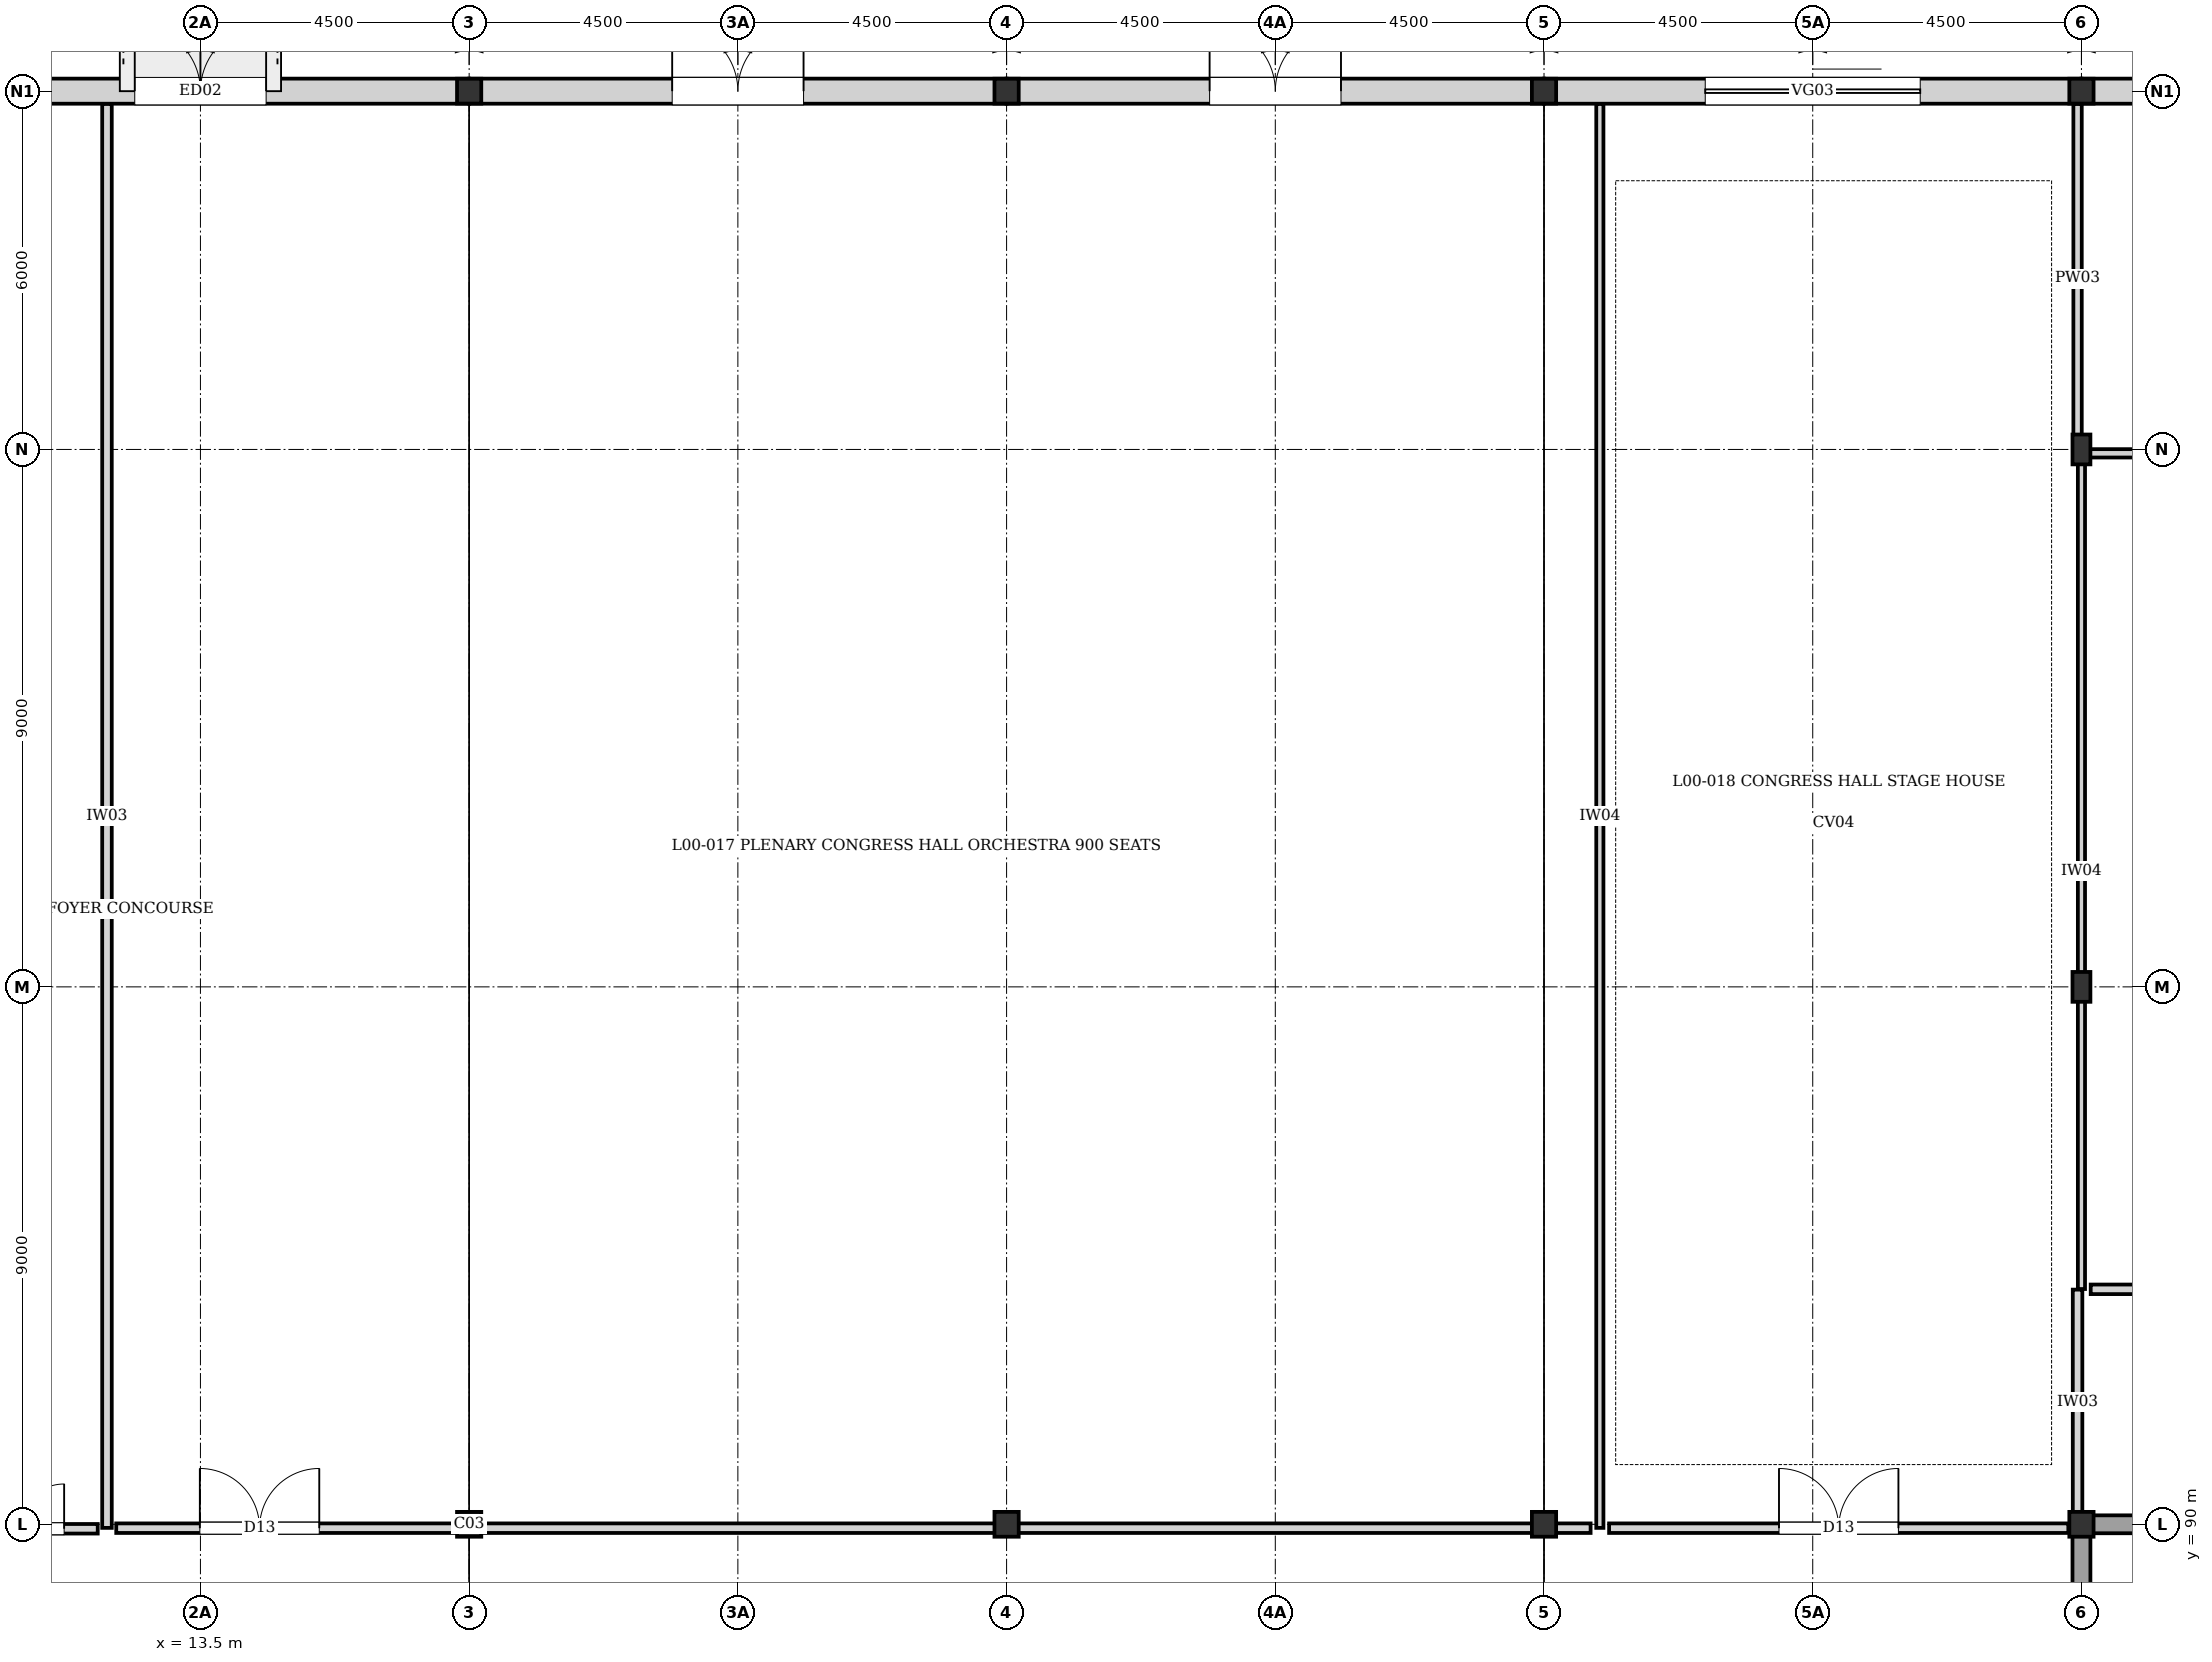
"""IFC4 building model, lengths in metres.
Left out: names, types, materials, properties, quantities, classifications, styles, units other than length and angle.
Written with IfcOpenShell. Run it as: python <this file> out.ifc"""

import sys

from ifc_helpers import new_model, si_unit, direction, frame, frame_2d, origin, origin_2d, place, context, subcontext, project, spatial, rectangle, i_section, extrude, element, fill, save


model = new_model("IFC4")
c1 = context("Model", 3, precision=1e-05, world=origin(), true_north=direction((0.0, 1.0)))
c2 = subcontext(c1, "Body", "Model", "MODEL_VIEW")
j1 = project(units=[si_unit("LENGTHUNIT", "METRE"), si_unit("PLANEANGLEUNIT", "RADIAN")], contexts=[c1])
p1 = place(None, origin())
s1 = spatial("IfcSite", under=j1, at=p1, CompositionType="ELEMENT")
p2 = place(p1, origin())
s2 = spatial("IfcBuilding", under=s1, at=p2, CompositionType="ELEMENT")
p3 = place(p2, origin())
s3 = spatial("IfcBuildingStorey", under=s2, at=p3, CompositionType="ELEMENT", Elevation=0.0)
for number, where, z_axis, x_axis in (
    (1, (18.0, 90.0, 0.0), (0.0, 0.0, 1.0), (1.0, 0.0, 0.0)),
    (2, (18.0, 114.0, 0.0), (0.0, 0.0, 1.0), (1.0, 0.0, 0.0)),
    (3, (27.0, 90.0, 0.0), (0.0, 0.0, 1.0), (1.0, 0.0, 0.0)),
    (4, (27.0, 114.0, 0.0), (0.0, 0.0, 1.0), (1.0, 0.0, 0.0)),
    (5, (36.0, 90.0, 0.0), (0.0, 0.0, 1.0), (1.0, 0.0, 0.0)),
    (6, (36.0, 114.0, 0.0), (0.0, 0.0, 1.0), (1.0, 0.0, 0.0)),
    (7, (45.0, 90.0, 0.0), (0.0, 0.0, 1.0), (1.0, 0.0, 0.0)),
):
    element("IfcColumn", number, at=place(p3, frame(where, z_axis=z_axis, x_axis=x_axis)), inside=s3, PredefinedType="COLUMN", context=c2, shape_type="SweptSolid", body=[
        extrude(i_section(OverallWidth=0.406, OverallDepth=0.416, WebThickness=0.022, FlangeThickness=0.038, at=origin_2d()), origin(), (0.0, 0.0, 1.0), 4.32),
    ])
for number, where, z_axis, x_axis in (
    (8, (45.0, 99.0, 0.0), (0.0, 0.0, 1.0), (1.0, 0.0, 0.0)),
    (9, (45.0, 108.0, 0.0), (0.0, 0.0, 1.0), (1.0, 0.0, 0.0)),
):
    element("IfcColumn", number, at=place(p3, frame(where, z_axis=z_axis, x_axis=x_axis)), inside=s3, PredefinedType="COLUMN", context=c2, shape_type="SweptSolid", body=[
        extrude(i_section(OverallWidth=0.3, OverallDepth=0.5, WebThickness=0.014, FlangeThickness=0.028, at=origin_2d()), origin(), (0.0, 0.0, 1.0), 4.32),
    ])
p4 = place(p3, frame((45.0, 114.0, 0.0), z_axis=(0.0, 0.0, 1.0), x_axis=(1.0, 0.0, 0.0)))
e10 = element("IfcColumn", 10, at=p4, inside=s3, PredefinedType="COLUMN", context=c2, shape_type="SweptSolid", body=[
    extrude(i_section(OverallWidth=0.406, OverallDepth=0.416, WebThickness=0.022, FlangeThickness=0.038, at=origin_2d()), origin(), (0.0, 0.0, 1.0), 4.32),
])
p5 = place(p3, frame((9.0, 114.0, 0.0), z_axis=(0.0, 0.0, 1.0), x_axis=(1.0, 0.0, 0.0)))
e11 = element("IfcWall", 11, at=p5, inside=s3, PredefinedType="SOLIDWALL", context=c2, shape_type="SweptSolid", body=[
    extrude(rectangle(XDim=9.0, YDim=0.42, at=frame_2d((4.5, 0.0))), origin(), (0.0, 0.0, 1.0), 3.655),
])
p6 = place(p5, frame((3.4, 0.0, 0.0)))
e12 = element("IfcOpeningElement", 12, at=p6, cuts=e11, PredefinedType="OPENING", context=c2, shape_type="SweptSolid", body=[
    extrude(rectangle(XDim=2.2, YDim=2.5, at=frame_2d((1.1, 1.25))), frame((0.0, 0.22, 0.0), z_axis=(0.0, -1.0, 0.0), x_axis=(1.0, 0.0, 0.0)), (0.0, 0.0, 1.0), 0.44),
])
p7 = place(p3, frame((18.0, 114.0, 0.0), z_axis=(0.0, 0.0, 1.0), x_axis=(1.0, 0.0, 0.0)))
e13 = element("IfcWall", 13, at=p7, inside=s3, PredefinedType="SOLIDWALL", context=c2, shape_type="SweptSolid", body=[
    extrude(rectangle(XDim=9.0, YDim=0.42, at=frame_2d((4.5, 0.0))), origin(), (0.0, 0.0, 1.0), 3.825),
])
p8 = place(p7, frame((3.4, 0.0, 0.0)))
e14 = element("IfcOpeningElement", 14, at=p8, cuts=e13, PredefinedType="OPENING", context=c2, shape_type="SweptSolid", body=[
    extrude(rectangle(XDim=2.2, YDim=2.5, at=frame_2d((1.1, 1.25))), frame((0.0, 0.22, 0.0), z_axis=(0.0, -1.0, 0.0), x_axis=(1.0, 0.0, 0.0)), (0.0, 0.0, 1.0), 0.44),
])
p9 = place(p3, frame((27.0, 114.0, 0.0), z_axis=(0.0, 0.0, 1.0), x_axis=(1.0, 0.0, 0.0)))
e15 = element("IfcWall", 15, at=p9, inside=s3, PredefinedType="SOLIDWALL", context=c2, shape_type="SweptSolid", body=[
    extrude(rectangle(XDim=9.0, YDim=0.42, at=frame_2d((4.5, 0.0))), origin(), (0.0, 0.0, 1.0), 3.755),
])
p10 = place(p9, frame((3.4, 0.0, 0.0)))
e16 = element("IfcOpeningElement", 16, at=p10, cuts=e15, PredefinedType="OPENING", context=c2, shape_type="SweptSolid", body=[
    extrude(rectangle(XDim=2.2, YDim=2.5, at=frame_2d((1.1, 1.25))), frame((0.0, 0.22, 0.0), z_axis=(0.0, -1.0, 0.0), x_axis=(1.0, 0.0, 0.0)), (0.0, 0.0, 1.0), 0.44),
])
p11 = place(p3, frame((36.0, 114.0, 0.0), z_axis=(0.0, 0.0, 1.0), x_axis=(1.0, 0.0, 0.0)))
e17 = element("IfcWall", 17, at=p11, inside=s3, PredefinedType="SOLIDWALL", context=c2, shape_type="SweptSolid", body=[
    extrude(rectangle(XDim=9.0, YDim=0.42, at=frame_2d((4.5, 0.0))), origin(), (0.0, 0.0, 1.0), 3.695),
])
p12 = place(p11, frame((2.7, 0.0, 0.0)))
e18 = element("IfcOpeningElement", 18, at=p12, cuts=e17, PredefinedType="OPENING", context=c2, shape_type="SweptSolid", body=[
    extrude(rectangle(XDim=3.6, YDim=3.1, at=frame_2d((1.8, 1.55))), frame((0.0, 0.22, 0.0), z_axis=(0.0, -1.0, 0.0), x_axis=(1.0, 0.0, 0.0)), (0.0, 0.0, 1.0), 0.44),
])
p13 = place(p3, frame((45.0, 114.0, 0.0), z_axis=(0.0, 0.0, 1.0), x_axis=(1.0, 0.0, 0.0)))
e19 = element("IfcWall", 19, at=p13, inside=s3, PredefinedType="SOLIDWALL", context=c2, shape_type="SweptSolid", body=[
    extrude(rectangle(XDim=9.0, YDim=0.42, at=frame_2d((4.5, 0.0))), origin(), (0.0, 0.0, 1.0), 3.655),
])
p14 = place(p3, frame((45.0, 90.0, 0.0), z_axis=(0.0, 0.0, 1.0), x_axis=(1.0, 0.0, 0.0)))
e20 = element("IfcWall", 20, at=p14, inside=s3, PredefinedType="SHEAR", context=c2, shape_type="SweptSolid", body=[
    extrude(rectangle(XDim=9.0, YDim=0.3, at=frame_2d((4.5, 0.0))), origin(), (0.0, 0.0, 1.0), 4.055),
])
p15 = place(p14, frame((6.05, 0.0, 0.0)))
e21 = element("IfcOpeningElement", 21, at=p15, cuts=e20, PredefinedType="OPENING", context=c2, shape_type="SweptSolid", body=[
    extrude(rectangle(XDim=1.4, YDim=2.02, at=frame_2d((0.7, 1.01))), frame((0.0, 0.16, 0.0), z_axis=(0.0, -1.0, 0.0), x_axis=(1.0, 0.0, 0.0)), (0.0, 0.0, 1.0), 0.32),
])
p16 = place(p3, frame((45.0, 81.0, 0.0), z_axis=(0.0, 0.0, 1.0), x_axis=(0.0, 1.0, 0.0)))
e22 = element("IfcWall", 22, at=p16, inside=s3, PredefinedType="SHEAR", context=c2, shape_type="SweptSolid", body=[
    extrude(rectangle(XDim=9.0, YDim=0.3, at=frame_2d((4.5, 0.0))), origin(), (0.0, 0.0, 1.0), 4.055),
])
p17 = place(p3, frame((11.935, 89.94, 0.0), z_axis=(0.0, 0.0, 1.0), x_axis=(0.0, 1.0, 0.0)))
e23 = element("IfcWall", 23, at=p17, inside=s3, PredefinedType="PARTITIONING", context=c2, shape_type="SweptSolid", body=[
    extrude(rectangle(XDim=23.845, YDim=0.16, at=frame_2d((11.922, 0.0))), origin(), (0.0, 0.0, 1.0), 4.055),
])
p18 = place(p3, frame((36.935, 89.94, 0.0), z_axis=(0.0, 0.0, 1.0), x_axis=(0.0, 1.0, 0.0)))
e24 = element("IfcWall", 24, at=p18, inside=s3, PredefinedType="PARTITIONING", context=c2, shape_type="SweptSolid", body=[
    extrude(rectangle(XDim=23.845, YDim=0.12, at=frame_2d((11.922, 0.0))), origin(), (0.0, 0.0, 1.0), 4.055),
])
p19 = place(p3, frame((44.935, 90.155, 0.0), z_axis=(0.0, 0.0, 1.0), x_axis=(0.0, 1.0, 0.0)))
e25 = element("IfcWall", 25, at=p19, inside=s3, PredefinedType="PARTITIONING", context=c2, shape_type="SweptSolid", body=[
    extrude(rectangle(XDim=3.775, YDim=0.16, at=frame_2d((1.887, 0.0))), origin(), (0.0, 0.0, 1.0), 4.055),
])
p20 = place(p3, frame((45.0, 93.94, 0.0), z_axis=(0.0, 0.0, 1.0), x_axis=(0.0, 1.0, 0.0)))
e26 = element("IfcWall", 26, at=p20, inside=s3, PredefinedType="PARTITIONING", context=c2, shape_type="SweptSolid", body=[
    extrude(rectangle(XDim=13.99, YDim=0.12, at=frame_2d((6.995, 0.0))), origin(), (0.0, 0.0, 1.0), 4.055),
])
p21 = place(p3, frame((44.935, 107.94, 0.0), z_axis=(0.0, 0.0, 1.0), x_axis=(0.0, 1.0, 0.0)))
e27 = element("IfcWall", 27, at=p21, inside=s3, PredefinedType="PLUMBINGWALL", context=c2, shape_type="SweptSolid", body=[
    extrude(rectangle(XDim=5.845, YDim=0.14, at=frame_2d((2.922, 0.0))), origin(), (0.0, 0.0, 1.0), 4.055),
])
p22 = place(p3, frame((9.155, 89.925, 0.0), z_axis=(0.0, 0.0, 1.0), x_axis=(1.0, 0.0, 0.0)))
e28 = element("IfcWall", 28, at=p22, inside=s3, PredefinedType="PARTITIONING", context=c2, shape_type="SweptSolid", body=[
    extrude(rectangle(XDim=2.625, YDim=0.16, at=frame_2d((1.312, 0.0))), origin(), (0.0, 0.0, 1.0), 3.655),
])
p23 = place(p22, frame((0.562, 0.0, 0.0)))
e29 = element("IfcOpeningElement", 29, at=p23, cuts=e28, PredefinedType="OPENING", context=c2, shape_type="SweptSolid", body=[
    extrude(rectangle(XDim=1.5, YDim=2.1, at=frame_2d((0.75, 1.05))), frame((0.0, 0.09, 0.0), z_axis=(0.0, -1.0, 0.0), x_axis=(1.0, 0.0, 0.0)), (0.0, 0.0, 1.0), 0.18),
])
p24 = place(p3, frame((12.09, 89.935, 0.0), z_axis=(0.0, 0.0, 1.0), x_axis=(1.0, 0.0, 0.0)))
e30 = element("IfcWall", 30, at=p24, inside=s3, PredefinedType="PARTITIONING", context=c2, shape_type="SweptSolid", body=[
    extrude(rectangle(XDim=5.89, YDim=0.16, at=frame_2d((2.945, 0.0))), origin(), (0.0, 0.0, 1.0), 3.655),
])
p25 = place(p24, frame((1.4, 0.0, 0.0)))
e31 = element("IfcOpeningElement", 31, at=p25, cuts=e30, PredefinedType="OPENING", context=c2, shape_type="SweptSolid", body=[
    extrude(rectangle(XDim=2.0, YDim=2.35, at=frame_2d((1.0, 1.175))), frame((0.0, 0.09, 0.0), z_axis=(0.0, -1.0, 0.0), x_axis=(1.0, 0.0, 0.0)), (0.0, 0.0, 1.0), 0.18),
])
p26 = place(p3, frame((37.09, 89.935, 0.0), z_axis=(0.0, 0.0, 1.0), x_axis=(1.0, 0.0, 0.0)))
e32 = element("IfcWall", 32, at=p26, inside=s3, PredefinedType="PARTITIONING", context=c2, shape_type="SweptSolid", body=[
    extrude(rectangle(XDim=7.69, YDim=0.16, at=frame_2d((3.845, 0.0))), origin(), (0.0, 0.0, 1.0), 3.505),
])
p27 = place(p26, frame((2.845, 0.0, 0.0)))
e33 = element("IfcOpeningElement", 33, at=p27, cuts=e32, PredefinedType="OPENING", context=c2, shape_type="SweptSolid", body=[
    extrude(rectangle(XDim=2.0, YDim=2.35, at=frame_2d((1.0, 1.175))), frame((0.0, 0.09, 0.0), z_axis=(0.0, -1.0, 0.0), x_axis=(1.0, 0.0, 0.0)), (0.0, 0.0, 1.0), 0.18),
])
p28 = place(p3, frame((45.155, 93.935, 0.0), z_axis=(0.0, 0.0, 1.0), x_axis=(1.0, 0.0, 0.0)))
e34 = element("IfcWall", 34, at=p28, inside=s3, PredefinedType="PARTITIONING", context=c2, shape_type="SweptSolid", body=[
    extrude(rectangle(XDim=8.63, YDim=0.16, at=frame_2d((4.315, 0.0))), origin(), (0.0, 0.0, 1.0), 4.055),
])
p29 = place(p28, frame((3.815, 0.0, 0.0)))
e35 = element("IfcOpeningElement", 35, at=p29, cuts=e34, PredefinedType="OPENING", context=c2, shape_type="SweptSolid", body=[
    extrude(rectangle(XDim=1.0, YDim=2.1, at=frame_2d((0.5, 1.05))), frame((0.0, 0.09, 0.0), z_axis=(0.0, -1.0, 0.0), x_axis=(1.0, 0.0, 0.0)), (0.0, 0.0, 1.0), 0.18),
])
p30 = place(p3, frame((45.09, 107.935, 0.0), z_axis=(0.0, 0.0, 1.0), x_axis=(1.0, 0.0, 0.0)))
e36 = element("IfcWall", 36, at=p30, inside=s3, PredefinedType="PLUMBINGWALL", context=c2, shape_type="SweptSolid", body=[
    extrude(rectangle(XDim=8.695, YDim=0.14, at=frame_2d((4.347, 0.0))), origin(), (0.0, 0.0, 1.0), 4.055),
])
p31 = place(p30, frame((3.897, 0.0, 0.0)))
e37 = element("IfcOpeningElement", 37, at=p31, cuts=e36, PredefinedType="OPENING", context=c2, shape_type="SweptSolid", body=[
    extrude(rectangle(XDim=0.9, YDim=2.1, at=frame_2d((0.45, 1.05))), frame((0.0, 0.08, 0.0), z_axis=(0.0, -1.0, 0.0), x_axis=(1.0, 0.0, 0.0)), (0.0, 0.0, 1.0), 0.16),
])
p32 = place(p3, frame((17.98, 89.935, 0.0), z_axis=(0.0, 0.0, 1.0), x_axis=(1.0, 0.0, 0.0)))
e38 = element("IfcWall", 38, at=p32, inside=s3, PredefinedType="PARTITIONING", context=c2, shape_type="SweptSolid", body=[
    extrude(rectangle(XDim=9.0, YDim=0.16, at=frame_2d((4.5, 0.0))), origin(), (0.0, 0.0, 1.0), 3.605),
])
p33 = place(p3, frame((26.98, 89.935, 0.0), z_axis=(0.0, 0.0, 1.0), x_axis=(1.0, 0.0, 0.0)))
e39 = element("IfcWall", 39, at=p33, inside=s3, PredefinedType="PARTITIONING", context=c2, shape_type="SweptSolid", body=[
    extrude(rectangle(XDim=9.0, YDim=0.16, at=frame_2d((4.5, 0.0))), origin(), (0.0, 0.0, 1.0), 3.555),
])
p34 = place(p3, frame((35.98, 89.935, 0.0), z_axis=(0.0, 0.0, 1.0), x_axis=(1.0, 0.0, 0.0)))
e40 = element("IfcWall", 40, at=p34, inside=s3, PredefinedType="PARTITIONING", context=c2, shape_type="SweptSolid", body=[
    extrude(rectangle(XDim=0.8, YDim=0.16, at=frame_2d((0.4, 0.0))), origin(), (0.0, 0.0, 1.0), 3.505),
])
p35 = place(p6, origin())
e41 = element("IfcDoor", 41, at=p35, inside=s3, OperationType="DOUBLE_DOOR_SINGLE_SWING", PredefinedType="DOOR", context=c2, shape_type="SweptSolid", body=[
    extrude(rectangle(XDim=2.2, YDim=2.5, at=frame_2d((1.1, 1.25))), frame((0.0, 0.025, 0.0), z_axis=(0.0, -1.0, 0.0), x_axis=(1.0, 0.0, 0.0)), (0.0, 0.0, 1.0), 0.05),
])
fill(e12, e41)
p36 = place(p8, origin())
e42 = element("IfcDoor", 42, at=p36, inside=s3, OperationType="DOUBLE_DOOR_SINGLE_SWING", PredefinedType="DOOR", context=c2, shape_type="SweptSolid", body=[
    extrude(rectangle(XDim=2.2, YDim=2.5, at=frame_2d((1.1, 1.25))), frame((0.0, 0.025, 0.0), z_axis=(0.0, -1.0, 0.0), x_axis=(1.0, 0.0, 0.0)), (0.0, 0.0, 1.0), 0.05),
])
fill(e14, e42)
p37 = place(p10, origin())
e43 = element("IfcDoor", 43, at=p37, inside=s3, OperationType="DOUBLE_DOOR_SINGLE_SWING", PredefinedType="DOOR", context=c2, shape_type="SweptSolid", body=[
    extrude(rectangle(XDim=2.2, YDim=2.5, at=frame_2d((1.1, 1.25))), frame((0.0, 0.025, 0.0), z_axis=(0.0, -1.0, 0.0), x_axis=(1.0, 0.0, 0.0)), (0.0, 0.0, 1.0), 0.05),
])
fill(e16, e43)
p38 = place(p12, origin())
e44 = element("IfcDoor", 44, at=p38, inside=s3, OperationType="ROLLINGUP", PredefinedType="GATE", context=c2, shape_type="SweptSolid", body=[
    extrude(rectangle(XDim=3.6, YDim=3.1, at=frame_2d((1.8, 1.55))), frame((0.0, 0.025, 0.0), z_axis=(0.0, -1.0, 0.0), x_axis=(1.0, 0.0, 0.0)), (0.0, 0.0, 1.0), 0.05),
])
fill(e18, e44)
p39 = place(p23, origin())
e45 = element("IfcDoor", 45, at=p39, inside=s3, OperationType="DOUBLE_DOOR_SINGLE_SWING", PredefinedType="DOOR", context=c2, shape_type="SweptSolid", body=[
    extrude(rectangle(XDim=1.5, YDim=2.1, at=frame_2d((0.75, 1.05))), frame((0.0, 0.025, 0.0), z_axis=(0.0, -1.0, 0.0), x_axis=(1.0, 0.0, 0.0)), (0.0, 0.0, 1.0), 0.05),
])
fill(e29, e45)
p40 = place(p25, origin())
e46 = element("IfcDoor", 46, at=p40, inside=s3, OperationType="DOUBLE_DOOR_SINGLE_SWING", PredefinedType="DOOR", context=c2, shape_type="SweptSolid", body=[
    extrude(rectangle(XDim=2.0, YDim=2.35, at=frame_2d((1.0, 1.175))), frame((0.0, 0.025, 0.0), z_axis=(0.0, -1.0, 0.0), x_axis=(1.0, 0.0, 0.0)), (0.0, 0.0, 1.0), 0.05),
])
fill(e31, e46)
p41 = place(p27, origin())
e47 = element("IfcDoor", 47, at=p41, inside=s3, OperationType="DOUBLE_DOOR_SINGLE_SWING", PredefinedType="DOOR", context=c2, shape_type="SweptSolid", body=[
    extrude(rectangle(XDim=2.0, YDim=2.35, at=frame_2d((1.0, 1.175))), frame((0.0, 0.025, 0.0), z_axis=(0.0, -1.0, 0.0), x_axis=(1.0, 0.0, 0.0)), (0.0, 0.0, 1.0), 0.05),
])
fill(e33, e47)
save(model, sys.argv[1])
